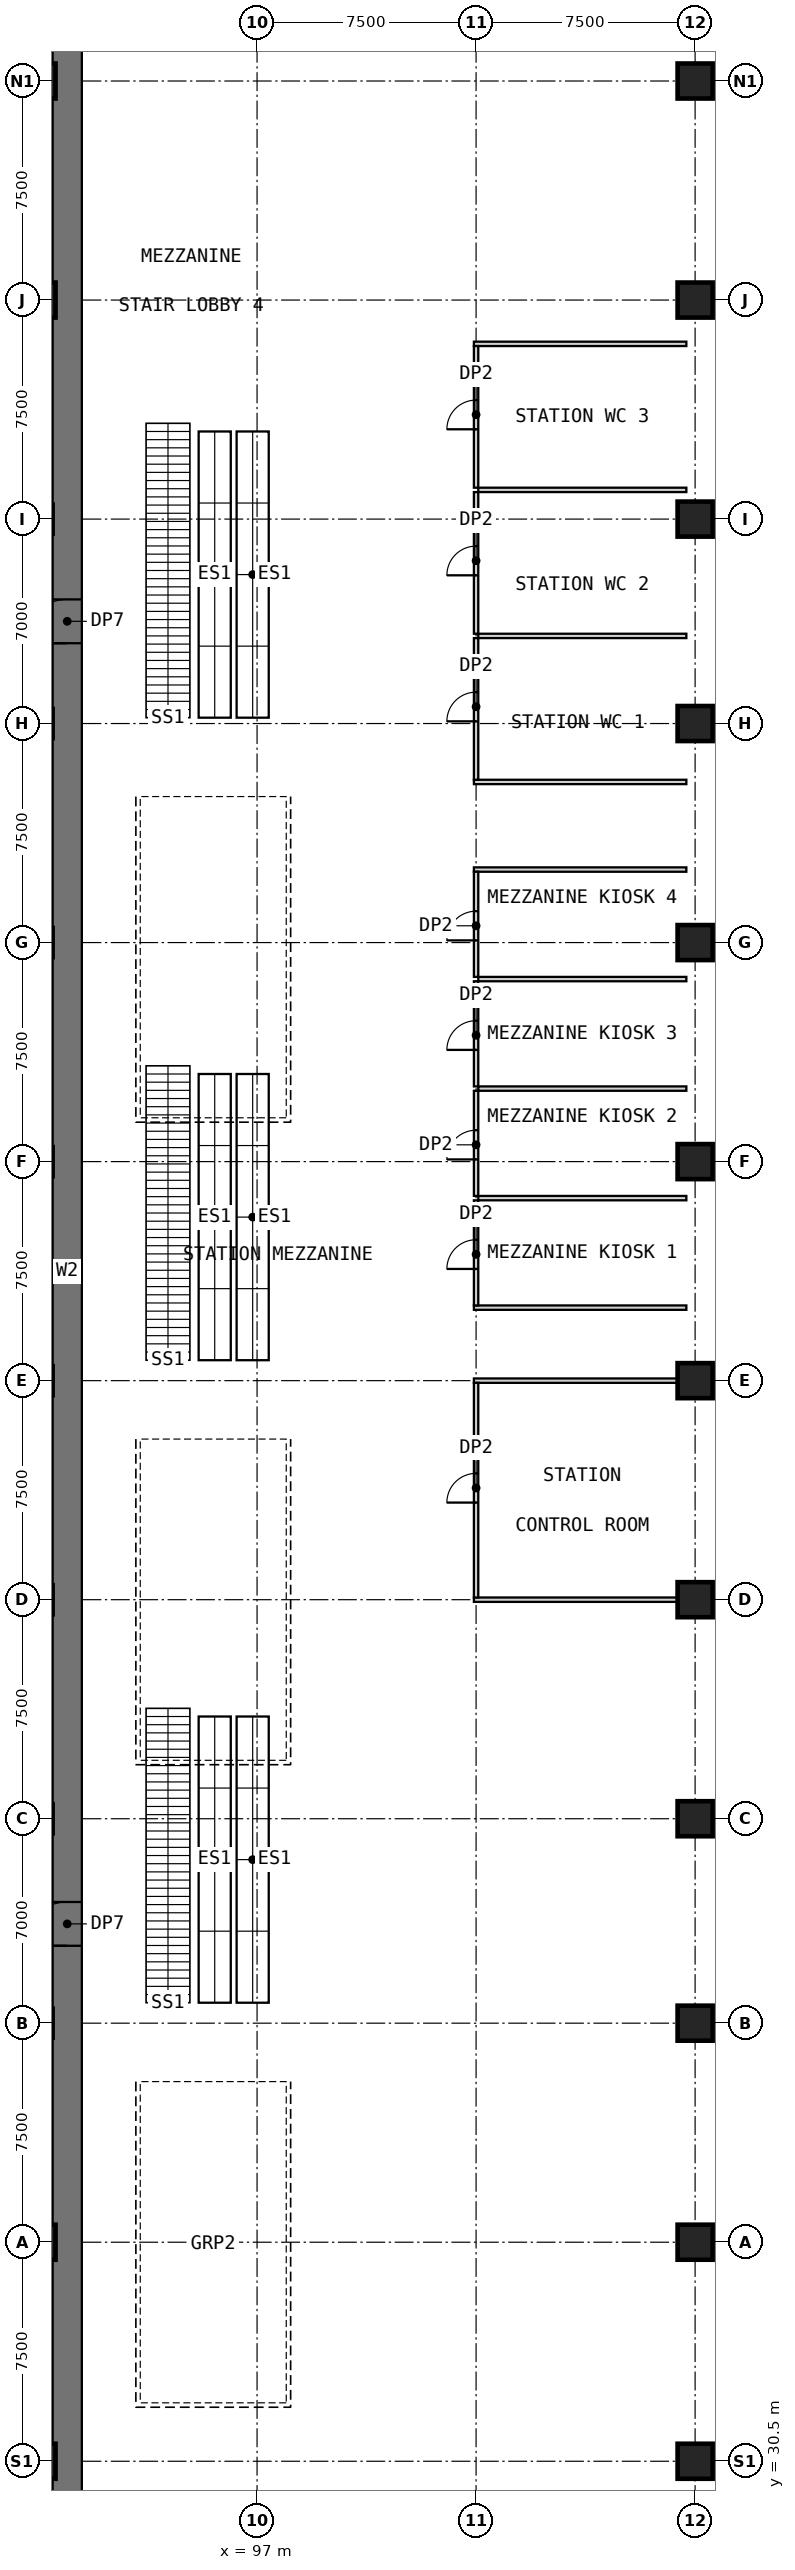
"""IFC4 building model, lengths in metres.
Left out: names, types, materials, properties, quantities, classifications, styles, units other than length and angle.
Written with IfcOpenShell. Run it as: python <this file> out.ifc"""

import sys

from ifc_helpers import new_model, si_unit, direction, frame, frame_2d, origin, origin_2d, place, context, subcontext, project, spatial, rectangle, extrude, element, fill, save


model = new_model("IFC4")
c1 = context("Model", 3, precision=1e-05, world=origin(), true_north=direction((0.0, 1.0)))
c2 = subcontext(c1, "Body", "Model", "MODEL_VIEW")
j1 = project(units=[si_unit("LENGTHUNIT", "METRE"), si_unit("PLANEANGLEUNIT", "RADIAN")], contexts=[c1])
p1 = place(None, origin())
s1 = spatial("IfcSite", under=j1, at=p1, CompositionType="ELEMENT")
p2 = place(p1, origin())
s2 = spatial("IfcBuilding", under=s1, at=p2, CompositionType="ELEMENT")
p3 = place(p2, frame((0.0, 0.0, -6.0)))
s3 = spatial("IfcBuildingStorey", under=s2, at=p3, CompositionType="ELEMENT", Elevation=-6.0)
p4 = place(p3, frame((90.5, 25.0, 0.0), z_axis=(0.0, 0.0, 1.0), x_axis=(0.0, 1.0, 0.0)))
e1 = element("IfcWall", 1, at=p4, inside=s3, PredefinedType="SHEAR", context=c2, shape_type="SweptSolid", body=[
    extrude(rectangle(XDim=92.5, YDim=1.0, at=frame_2d((46.25, 0.0))), origin(), (0.0, 0.0, 1.0), 4.8),
])
p5 = place(p4, frame((23.15, 0.0, 0.0)))
e2 = element("IfcOpeningElement", 2, at=p5, cuts=e1, PredefinedType="OPENING", context=c2, shape_type="SweptSolid", body=[
    extrude(rectangle(XDim=1.5, YDim=2.1, at=frame_2d((0.75, 1.05))), frame((0.0, 0.51, 0.0), z_axis=(0.0, -1.0, 0.0), x_axis=(1.0, 0.0, 0.0)), (0.0, 0.0, 1.0), 1.02),
])
p6 = place(p4, frame((67.75, 0.0, 0.0)))
e3 = element("IfcOpeningElement", 3, at=p6, cuts=e1, PredefinedType="OPENING", context=c2, shape_type="SweptSolid", body=[
    extrude(rectangle(XDim=1.5, YDim=2.1, at=frame_2d((0.75, 1.05))), frame((0.0, 0.51, 0.0), z_axis=(0.0, -1.0, 0.0), x_axis=(1.0, 0.0, 0.0)), (0.0, 0.0, 1.0), 1.02),
])
for number, where, z_axis, x_axis in (
    (4, (89.5, 30.5, 0.0), (0.0, 0.0, 1.0), (1.0, 0.0, 0.0)),
    (5, (89.5, 38.0, 0.0), (0.0, 0.0, 1.0), (1.0, 0.0, 0.0)),
    (6, (89.5, 104.5, 0.0), (0.0, 0.0, 1.0), (1.0, 0.0, 0.0)),
    (7, (89.5, 112.0, 0.0), (0.0, 0.0, 1.0), (1.0, 0.0, 0.0)),
    (8, (112.0, 30.5, 0.0), (0.0, 0.0, 1.0), (1.0, 0.0, 0.0)),
    (9, (112.0, 38.0, 0.0), (0.0, 0.0, 1.0), (1.0, 0.0, 0.0)),
    (10, (112.0, 45.5, 0.0), (0.0, 0.0, 1.0), (1.0, 0.0, 0.0)),
    (11, (112.0, 52.5, 0.0), (0.0, 0.0, 1.0), (1.0, 0.0, 0.0)),
    (12, (112.0, 60.0, 0.0), (0.0, 0.0, 1.0), (1.0, 0.0, 0.0)),
    (13, (112.0, 67.5, 0.0), (0.0, 0.0, 1.0), (1.0, 0.0, 0.0)),
    (14, (112.0, 75.0, 0.0), (0.0, 0.0, 1.0), (1.0, 0.0, 0.0)),
    (15, (112.0, 82.5, 0.0), (0.0, 0.0, 1.0), (1.0, 0.0, 0.0)),
    (16, (112.0, 90.0, 0.0), (0.0, 0.0, 1.0), (1.0, 0.0, 0.0)),
    (17, (112.0, 97.0, 0.0), (0.0, 0.0, 1.0), (1.0, 0.0, 0.0)),
    (18, (112.0, 104.5, 0.0), (0.0, 0.0, 1.0), (1.0, 0.0, 0.0)),
    (19, (112.0, 112.0, 0.0), (0.0, 0.0, 1.0), (1.0, 0.0, 0.0)),
):
    element("IfcColumn", number, at=place(p3, frame(where, z_axis=z_axis, x_axis=x_axis)), inside=s3, PredefinedType="COLUMN", context=c2, shape_type="SweptSolid", body=[
        extrude(rectangle(XDim=1.2, YDim=1.2, at=origin_2d()), origin(), (0.0, 0.0, 1.0), 6.0),
    ])
for number, where, z_axis, x_axis in (
    (20, (104.425, 60.0, 0.0), (0.0, 0.0, 1.0), (1.0, 0.0, 0.0)),
    (21, (104.425, 67.5, 0.0), (0.0, 0.0, 1.0), (1.0, 0.0, 0.0)),
):
    element("IfcWall", number, at=place(p3, frame(where, z_axis=z_axis, x_axis=x_axis)), inside=s3, PredefinedType="PARTITIONING", context=c2, shape_type="SweptSolid", body=[
        extrude(rectangle(XDim=6.975, YDim=0.15, at=frame_2d((3.487, 0.0))), origin(), (0.0, 0.0, 1.0), 5.7),
    ])
p7 = place(p3, frame((104.425, 70.0, 0.0), z_axis=(0.0, 0.0, 1.0), x_axis=(1.0, 0.0, 0.0)))
e22 = element("IfcWall", 22, at=p7, inside=s3, PredefinedType="PARTITIONING", context=c2, shape_type="SweptSolid", body=[
    extrude(rectangle(XDim=7.275, YDim=0.15, at=frame_2d((3.637, 0.0))), origin(), (0.0, 0.0, 1.0), 5.7),
])
for number, where, z_axis, x_axis in (
    (23, (104.575, 73.75, 0.0), (0.0, 0.0, 1.0), (1.0, 0.0, 0.0)),
    (24, (104.575, 77.5, 0.0), (0.0, 0.0, 1.0), (1.0, 0.0, 0.0)),
    (25, (104.575, 81.25, 0.0), (0.0, 0.0, 1.0), (1.0, 0.0, 0.0)),
):
    element("IfcWall", number, at=place(p3, frame(where, z_axis=z_axis, x_axis=x_axis)), inside=s3, PredefinedType="PARTITIONING", context=c2, shape_type="SweptSolid", body=[
        extrude(rectangle(XDim=7.125, YDim=0.15, at=frame_2d((3.562, 0.0))), origin(), (0.0, 0.0, 1.0), 5.7),
    ])
for number, where, z_axis, x_axis in (
    (26, (104.425, 85.0, 0.0), (0.0, 0.0, 1.0), (1.0, 0.0, 0.0)),
    (27, (104.425, 88.0, 0.0), (0.0, 0.0, 1.0), (1.0, 0.0, 0.0)),
):
    element("IfcWall", number, at=place(p3, frame(where, z_axis=z_axis, x_axis=x_axis)), inside=s3, PredefinedType="PARTITIONING", context=c2, shape_type="SweptSolid", body=[
        extrude(rectangle(XDim=7.275, YDim=0.15, at=frame_2d((3.637, 0.0))), origin(), (0.0, 0.0, 1.0), 5.7),
    ])
for number, where, z_axis, x_axis in (
    (28, (104.575, 93.0, 0.0), (0.0, 0.0, 1.0), (1.0, 0.0, 0.0)),
    (29, (104.575, 98.0, 0.0), (0.0, 0.0, 1.0), (1.0, 0.0, 0.0)),
):
    element("IfcWall", number, at=place(p3, frame(where, z_axis=z_axis, x_axis=x_axis)), inside=s3, PredefinedType="PARTITIONING", context=c2, shape_type="SweptSolid", body=[
        extrude(rectangle(XDim=7.125, YDim=0.15, at=frame_2d((3.562, 0.0))), origin(), (0.0, 0.0, 1.0), 5.7),
    ])
p8 = place(p3, frame((104.425, 103.0, 0.0), z_axis=(0.0, 0.0, 1.0), x_axis=(1.0, 0.0, 0.0)))
e30 = element("IfcWall", 30, at=p8, inside=s3, PredefinedType="PARTITIONING", context=c2, shape_type="SweptSolid", body=[
    extrude(rectangle(XDim=7.275, YDim=0.15, at=frame_2d((3.637, 0.0))), origin(), (0.0, 0.0, 1.0), 5.7),
])
p9 = place(p3, frame((104.5, 60.075, 0.0), z_axis=(0.0, 0.0, 1.0), x_axis=(0.0, 1.0, 0.0)))
e31 = element("IfcWall", 31, at=p9, inside=s3, PredefinedType="PARTITIONING", context=c2, shape_type="SweptSolid", body=[
    extrude(rectangle(XDim=7.35, YDim=0.15, at=frame_2d((3.675, 0.0))), origin(), (0.0, 0.0, 1.0), 5.7),
])
p10 = place(p9, frame((3.25, 0.0, 0.0)))
e32 = element("IfcOpeningElement", 32, at=p10, cuts=e31, PredefinedType="OPENING", context=c2, shape_type="SweptSolid", body=[
    extrude(rectangle(XDim=1.0, YDim=2.1, at=frame_2d((0.5, 1.05))), frame((0.0, 0.085, 0.0), z_axis=(0.0, -1.0, 0.0), x_axis=(1.0, 0.0, 0.0)), (0.0, 0.0, 1.0), 0.17),
])
p11 = place(p3, frame((104.5, 70.075, 0.0), z_axis=(0.0, 0.0, 1.0), x_axis=(0.0, 1.0, 0.0)))
e33 = element("IfcWall", 33, at=p11, inside=s3, PredefinedType="PARTITIONING", context=c2, shape_type="SweptSolid", body=[
    extrude(rectangle(XDim=3.6, YDim=0.15, at=frame_2d((1.8, 0.0))), origin(), (0.0, 0.0, 1.0), 5.7),
])
p12 = place(p11, frame((1.25, 0.0, 0.0)))
e34 = element("IfcOpeningElement", 34, at=p12, cuts=e33, PredefinedType="OPENING", context=c2, shape_type="SweptSolid", body=[
    extrude(rectangle(XDim=1.0, YDim=2.1, at=frame_2d((0.5, 1.05))), frame((0.0, 0.085, 0.0), z_axis=(0.0, -1.0, 0.0), x_axis=(1.0, 0.0, 0.0)), (0.0, 0.0, 1.0), 0.17),
])
p13 = place(p3, frame((104.5, 73.825, 0.0), z_axis=(0.0, 0.0, 1.0), x_axis=(0.0, 1.0, 0.0)))
e35 = element("IfcWall", 35, at=p13, inside=s3, PredefinedType="PARTITIONING", context=c2, shape_type="SweptSolid", body=[
    extrude(rectangle(XDim=3.6, YDim=0.15, at=frame_2d((1.8, 0.0))), origin(), (0.0, 0.0, 1.0), 5.7),
])
p14 = place(p13, frame((1.25, 0.0, 0.0)))
e36 = element("IfcOpeningElement", 36, at=p14, cuts=e35, PredefinedType="OPENING", context=c2, shape_type="SweptSolid", body=[
    extrude(rectangle(XDim=1.0, YDim=2.1, at=frame_2d((0.5, 1.05))), frame((0.0, 0.085, 0.0), z_axis=(0.0, -1.0, 0.0), x_axis=(1.0, 0.0, 0.0)), (0.0, 0.0, 1.0), 0.17),
])
p15 = place(p3, frame((104.5, 77.575, 0.0), z_axis=(0.0, 0.0, 1.0), x_axis=(0.0, 1.0, 0.0)))
e37 = element("IfcWall", 37, at=p15, inside=s3, PredefinedType="PARTITIONING", context=c2, shape_type="SweptSolid", body=[
    extrude(rectangle(XDim=3.6, YDim=0.15, at=frame_2d((1.8, 0.0))), origin(), (0.0, 0.0, 1.0), 5.7),
])
p16 = place(p15, frame((1.25, 0.0, 0.0)))
e38 = element("IfcOpeningElement", 38, at=p16, cuts=e37, PredefinedType="OPENING", context=c2, shape_type="SweptSolid", body=[
    extrude(rectangle(XDim=1.0, YDim=2.1, at=frame_2d((0.5, 1.05))), frame((0.0, 0.085, 0.0), z_axis=(0.0, -1.0, 0.0), x_axis=(1.0, 0.0, 0.0)), (0.0, 0.0, 1.0), 0.17),
])
p17 = place(p3, frame((104.5, 81.325, 0.0), z_axis=(0.0, 0.0, 1.0), x_axis=(0.0, 1.0, 0.0)))
e39 = element("IfcWall", 39, at=p17, inside=s3, PredefinedType="PARTITIONING", context=c2, shape_type="SweptSolid", body=[
    extrude(rectangle(XDim=3.6, YDim=0.15, at=frame_2d((1.8, 0.0))), origin(), (0.0, 0.0, 1.0), 5.7),
])
p18 = place(p17, frame((1.25, 0.0, 0.0)))
e40 = element("IfcOpeningElement", 40, at=p18, cuts=e39, PredefinedType="OPENING", context=c2, shape_type="SweptSolid", body=[
    extrude(rectangle(XDim=1.0, YDim=2.1, at=frame_2d((0.5, 1.05))), frame((0.0, 0.085, 0.0), z_axis=(0.0, -1.0, 0.0), x_axis=(1.0, 0.0, 0.0)), (0.0, 0.0, 1.0), 0.17),
])
p19 = place(p3, frame((104.5, 88.075, 0.0), z_axis=(0.0, 0.0, 1.0), x_axis=(0.0, 1.0, 0.0)))
e41 = element("IfcWall", 41, at=p19, inside=s3, PredefinedType="PARTITIONING", context=c2, shape_type="SweptSolid", body=[
    extrude(rectangle(XDim=4.85, YDim=0.15, at=frame_2d((2.425, 0.0))), origin(), (0.0, 0.0, 1.0), 5.7),
])
p20 = place(p19, frame((2.0, 0.0, 0.0)))
e42 = element("IfcOpeningElement", 42, at=p20, cuts=e41, PredefinedType="OPENING", context=c2, shape_type="SweptSolid", body=[
    extrude(rectangle(XDim=1.0, YDim=2.1, at=frame_2d((0.5, 1.05))), frame((0.0, 0.085, 0.0), z_axis=(0.0, -1.0, 0.0), x_axis=(1.0, 0.0, 0.0)), (0.0, 0.0, 1.0), 0.17),
])
p21 = place(p3, frame((104.5, 93.075, 0.0), z_axis=(0.0, 0.0, 1.0), x_axis=(0.0, 1.0, 0.0)))
e43 = element("IfcWall", 43, at=p21, inside=s3, PredefinedType="PARTITIONING", context=c2, shape_type="SweptSolid", body=[
    extrude(rectangle(XDim=4.85, YDim=0.15, at=frame_2d((2.425, 0.0))), origin(), (0.0, 0.0, 1.0), 5.7),
])
p22 = place(p21, frame((2.0, 0.0, 0.0)))
e44 = element("IfcOpeningElement", 44, at=p22, cuts=e43, PredefinedType="OPENING", context=c2, shape_type="SweptSolid", body=[
    extrude(rectangle(XDim=1.0, YDim=2.1, at=frame_2d((0.5, 1.05))), frame((0.0, 0.085, 0.0), z_axis=(0.0, -1.0, 0.0), x_axis=(1.0, 0.0, 0.0)), (0.0, 0.0, 1.0), 0.17),
])
p23 = place(p3, frame((104.5, 98.075, 0.0), z_axis=(0.0, 0.0, 1.0), x_axis=(0.0, 1.0, 0.0)))
e45 = element("IfcWall", 45, at=p23, inside=s3, PredefinedType="PARTITIONING", context=c2, shape_type="SweptSolid", body=[
    extrude(rectangle(XDim=4.85, YDim=0.15, at=frame_2d((2.425, 0.0))), origin(), (0.0, 0.0, 1.0), 5.7),
])
p24 = place(p23, frame((2.0, 0.0, 0.0)))
e46 = element("IfcOpeningElement", 46, at=p24, cuts=e45, PredefinedType="OPENING", context=c2, shape_type="SweptSolid", body=[
    extrude(rectangle(XDim=1.0, YDim=2.1, at=frame_2d((0.5, 1.05))), frame((0.0, 0.085, 0.0), z_axis=(0.0, -1.0, 0.0), x_axis=(1.0, 0.0, 0.0)), (0.0, 0.0, 1.0), 0.17),
])
p25 = place(p10, origin())
e47 = element("IfcDoor", 47, at=p25, inside=s3, OperationType="SINGLE_SWING_LEFT", PredefinedType="DOOR", context=c2, shape_type="SweptSolid", body=[
    extrude(rectangle(XDim=1.0, YDim=2.1, at=frame_2d((0.5, 1.05))), frame((0.0, 0.025, 0.0), z_axis=(0.0, -1.0, 0.0), x_axis=(1.0, 0.0, 0.0)), (0.0, 0.0, 1.0), 0.05),
])
fill(e32, e47)
p26 = place(p12, origin())
e48 = element("IfcDoor", 48, at=p26, inside=s3, OperationType="SINGLE_SWING_LEFT", PredefinedType="DOOR", context=c2, shape_type="SweptSolid", body=[
    extrude(rectangle(XDim=1.0, YDim=2.1, at=frame_2d((0.5, 1.05))), frame((0.0, 0.025, 0.0), z_axis=(0.0, -1.0, 0.0), x_axis=(1.0, 0.0, 0.0)), (0.0, 0.0, 1.0), 0.05),
])
fill(e34, e48)
p27 = place(p14, origin())
e49 = element("IfcDoor", 49, at=p27, inside=s3, OperationType="SINGLE_SWING_LEFT", PredefinedType="DOOR", context=c2, shape_type="SweptSolid", body=[
    extrude(rectangle(XDim=1.0, YDim=2.1, at=frame_2d((0.5, 1.05))), frame((0.0, 0.025, 0.0), z_axis=(0.0, -1.0, 0.0), x_axis=(1.0, 0.0, 0.0)), (0.0, 0.0, 1.0), 0.05),
])
fill(e36, e49)
p28 = place(p16, origin())
e50 = element("IfcDoor", 50, at=p28, inside=s3, OperationType="SINGLE_SWING_LEFT", PredefinedType="DOOR", context=c2, shape_type="SweptSolid", body=[
    extrude(rectangle(XDim=1.0, YDim=2.1, at=frame_2d((0.5, 1.05))), frame((0.0, 0.025, 0.0), z_axis=(0.0, -1.0, 0.0), x_axis=(1.0, 0.0, 0.0)), (0.0, 0.0, 1.0), 0.05),
])
fill(e38, e50)
p29 = place(p18, origin())
e51 = element("IfcDoor", 51, at=p29, inside=s3, OperationType="SINGLE_SWING_LEFT", PredefinedType="DOOR", context=c2, shape_type="SweptSolid", body=[
    extrude(rectangle(XDim=1.0, YDim=2.1, at=frame_2d((0.5, 1.05))), frame((0.0, 0.025, 0.0), z_axis=(0.0, -1.0, 0.0), x_axis=(1.0, 0.0, 0.0)), (0.0, 0.0, 1.0), 0.05),
])
fill(e40, e51)
p30 = place(p20, origin())
e52 = element("IfcDoor", 52, at=p30, inside=s3, OperationType="SINGLE_SWING_LEFT", PredefinedType="DOOR", context=c2, shape_type="SweptSolid", body=[
    extrude(rectangle(XDim=1.0, YDim=2.1, at=frame_2d((0.5, 1.05))), frame((0.0, 0.025, 0.0), z_axis=(0.0, -1.0, 0.0), x_axis=(1.0, 0.0, 0.0)), (0.0, 0.0, 1.0), 0.05),
])
fill(e42, e52)
p31 = place(p22, origin())
e53 = element("IfcDoor", 53, at=p31, inside=s3, OperationType="SINGLE_SWING_LEFT", PredefinedType="DOOR", context=c2, shape_type="SweptSolid", body=[
    extrude(rectangle(XDim=1.0, YDim=2.1, at=frame_2d((0.5, 1.05))), frame((0.0, 0.025, 0.0), z_axis=(0.0, -1.0, 0.0), x_axis=(1.0, 0.0, 0.0)), (0.0, 0.0, 1.0), 0.05),
])
fill(e44, e53)
p32 = place(p24, origin())
e54 = element("IfcDoor", 54, at=p32, inside=s3, OperationType="SINGLE_SWING_LEFT", PredefinedType="DOOR", context=c2, shape_type="SweptSolid", body=[
    extrude(rectangle(XDim=1.0, YDim=2.1, at=frame_2d((0.5, 1.05))), frame((0.0, 0.025, 0.0), z_axis=(0.0, -1.0, 0.0), x_axis=(1.0, 0.0, 0.0)), (0.0, 0.0, 1.0), 0.05),
])
fill(e46, e54)
p33 = place(p5, origin())
e55 = element("IfcDoor", 55, at=p33, inside=s3, OperationType="SINGLE_SWING_LEFT", PredefinedType="DOOR", context=c2, shape_type="SweptSolid", body=[
    extrude(rectangle(XDim=1.5, YDim=2.1, at=frame_2d((0.75, 1.05))), frame((0.0, 0.025, 0.0), z_axis=(0.0, -1.0, 0.0), x_axis=(1.0, 0.0, 0.0)), (0.0, 0.0, 1.0), 0.05),
])
fill(e2, e55)
p34 = place(p6, origin())
e56 = element("IfcDoor", 56, at=p34, inside=s3, OperationType="SINGLE_SWING_LEFT", PredefinedType="DOOR", context=c2, shape_type="SweptSolid", body=[
    extrude(rectangle(XDim=1.5, YDim=2.1, at=frame_2d((0.75, 1.05))), frame((0.0, 0.025, 0.0), z_axis=(0.0, -1.0, 0.0), x_axis=(1.0, 0.0, 0.0)), (0.0, 0.0, 1.0), 0.05),
])
fill(e3, e56)
save(model, sys.argv[1])
